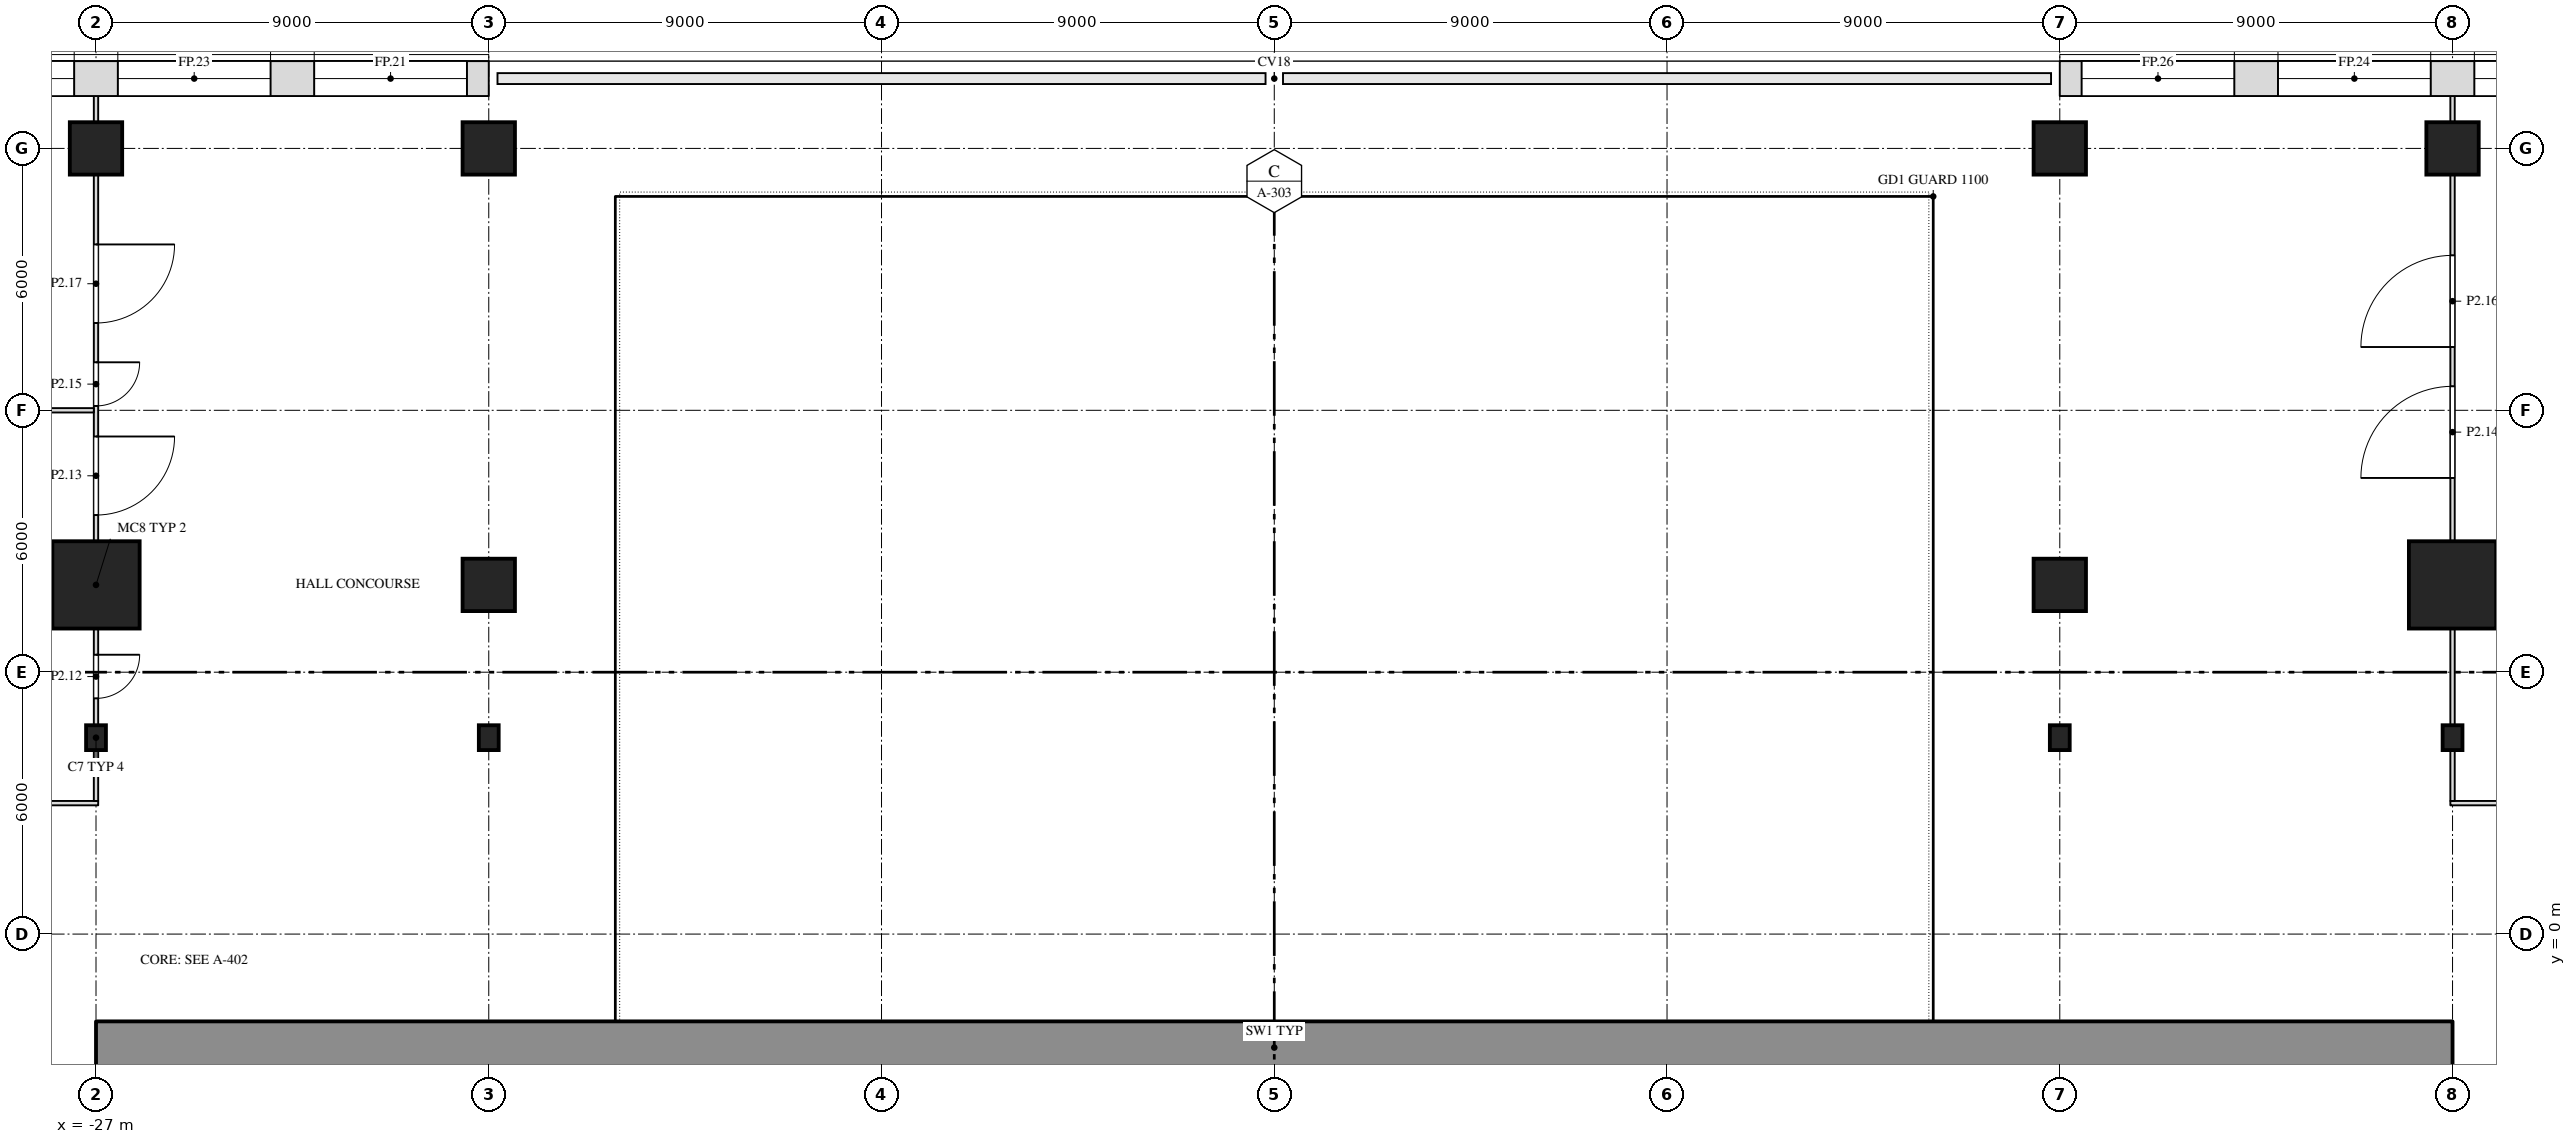
"""IFC4 building model, lengths in metres.
Left out: names, types, materials, properties, quantities, classifications, styles, units other than length and angle.
Written with IfcOpenShell. Run it as: python <this file> out.ifc"""

import sys

from ifc_helpers import new_model, si_unit, direction, frame, frame_2d, origin, origin_2d, place, context, subcontext, project, spatial, rectangle, i_section, extrude, element, fill, save


model = new_model("IFC4")
c1 = context("Model", 3, precision=1e-05, world=origin(), true_north=direction((0.0, 1.0)))
c2 = subcontext(c1, "Body", "Model", "MODEL_VIEW")
j1 = project(units=[si_unit("LENGTHUNIT", "METRE"), si_unit("PLANEANGLEUNIT", "RADIAN")], contexts=[c1])
p1 = place(None, origin())
s1 = spatial("IfcSite", under=j1, at=p1, CompositionType="ELEMENT")
p2 = place(p1, origin())
s2 = spatial("IfcBuilding", under=s1, at=p2, CompositionType="ELEMENT")
p3 = place(p2, frame((0.0, 0.0, 15.0)))
s3 = spatial("IfcBuildingStorey", under=s2, at=p3, CompositionType="ELEMENT", Elevation=15.0)
for number, where, z_axis, x_axis in (
    (1, (-27.0, 4.5, 0.0), (0.0, 0.0, 1.0), (1.0, 0.0, 0.0)),
    (2, (-18.0, 4.5, 0.0), (0.0, 0.0, 1.0), (1.0, 0.0, 0.0)),
    (3, (18.0, 4.5, 0.0), (0.0, 0.0, 1.0), (1.0, 0.0, 0.0)),
    (4, (27.0, 4.5, 0.0), (0.0, 0.0, 1.0), (1.0, 0.0, 0.0)),
):
    element("IfcColumn", number, at=place(p3, frame(where, z_axis=z_axis, x_axis=x_axis)), inside=s3, PredefinedType="COLUMN", context=c2, shape_type="SweptSolid", body=[
        extrude(i_section(OverallWidth=0.455, OverallDepth=0.569, WebThickness=0.078, FlangeThickness=0.125, at=origin_2d()), origin(), (0.0, 0.0, 1.0), 6.0),
    ])
p4 = place(p3, frame((-27.0, 8.0, 0.0), z_axis=(0.0, 0.0, 1.0), x_axis=(1.0, 0.0, 0.0)))
e5 = element("IfcColumn", 5, at=p4, inside=s3, PredefinedType="COLUMN", context=c2, shape_type="SweptSolid", body=[
    extrude(rectangle(XDim=2.0, YDim=2.0, at=origin_2d()), origin(), (0.0, 0.0, 1.0), 6.0),
])
for number, where, z_axis, x_axis in (
    (6, (-18.0, 8.0, 0.0), (0.0, 0.0, 1.0), (1.0, 0.0, 0.0)),
    (7, (18.0, 8.0, 0.0), (0.0, 0.0, 1.0), (1.0, 0.0, 0.0)),
):
    element("IfcColumn", number, at=place(p3, frame(where, z_axis=z_axis, x_axis=x_axis)), inside=s3, PredefinedType="COLUMN", context=c2, shape_type="SweptSolid", body=[
        extrude(rectangle(XDim=1.2, YDim=1.2, at=origin_2d()), origin(), (0.0, 0.0, 1.0), 6.0),
    ])
p5 = place(p3, frame((27.0, 8.0, 0.0), z_axis=(0.0, 0.0, 1.0), x_axis=(1.0, 0.0, 0.0)))
e8 = element("IfcColumn", 8, at=p5, inside=s3, PredefinedType="COLUMN", context=c2, shape_type="SweptSolid", body=[
    extrude(rectangle(XDim=2.0, YDim=2.0, at=origin_2d()), origin(), (0.0, 0.0, 1.0), 6.0),
])
for number, where, z_axis, x_axis in (
    (9, (-27.0, 18.0, 0.0), (0.0, 0.0, 1.0), (1.0, 0.0, 0.0)),
    (10, (-18.0, 18.0, 0.0), (0.0, 0.0, 1.0), (1.0, 0.0, 0.0)),
    (11, (18.0, 18.0, 0.0), (0.0, 0.0, 1.0), (1.0, 0.0, 0.0)),
    (12, (27.0, 18.0, 0.0), (0.0, 0.0, 1.0), (1.0, 0.0, 0.0)),
):
    element("IfcColumn", number, at=place(p3, frame(where, z_axis=z_axis, x_axis=x_axis)), inside=s3, PredefinedType="COLUMN", context=c2, shape_type="SweptSolid", body=[
        extrude(rectangle(XDim=1.2, YDim=1.2, at=origin_2d()), origin(), (0.0, 0.0, 1.0), 6.0),
    ])
p6 = place(p3, frame((-27.0, -2.6, 0.0), z_axis=(0.0, 0.0, 1.0), x_axis=(1.0, 0.0, 0.0)))
e13 = element("IfcWall", 13, at=p6, inside=s3, PredefinedType="SHEAR", context=c2, shape_type="SweptSolid", body=[
    extrude(rectangle(XDim=54.0, YDim=1.2, at=frame_2d((27.0, 0.0))), origin(), (0.0, 0.0, 1.0), 5.7),
])
p7 = place(p3, frame((-38.2, 3.0, 0.0), z_axis=(0.0, 0.0, 1.0), x_axis=(1.0, 0.0, 0.0)))
e14 = element("IfcWall", 14, at=p7, inside=s3, PredefinedType="PARTITIONING", context=c2, shape_type="SweptSolid", body=[
    extrude(rectangle(XDim=11.25, YDim=0.1, at=frame_2d((5.625, 0.0))), origin(), (0.0, 0.0, 1.0), 5.7),
])
p8 = place(p3, frame((-27.0, 3.05, 0.0), z_axis=(0.0, 0.0, 1.0), x_axis=(0.0, 1.0, 0.0)))
e15 = element("IfcWall", 15, at=p8, inside=s3, PredefinedType="PARTITIONING", context=c2, shape_type="SweptSolid", body=[
    extrude(rectangle(XDim=1.166, YDim=0.1, at=frame_2d((0.583, 0.0))), origin(), (0.0, 0.0, 1.0), 5.088),
])
p9 = place(p3, frame((-27.0, 4.784, 0.0), z_axis=(0.0, 0.0, 1.0), x_axis=(0.0, 1.0, 0.0)))
e16 = element("IfcWall", 16, at=p9, inside=s3, PredefinedType="PARTITIONING", context=c2, shape_type="SweptSolid", body=[
    extrude(rectangle(XDim=2.216, YDim=0.1, at=frame_2d((1.108, 0.0))), origin(), (0.0, 0.0, 1.0), 5.088),
])
p10 = place(p9, frame((0.615, 0.0, 0.0)))
e17 = element("IfcOpeningElement", 17, at=p10, cuts=e16, PredefinedType="OPENING", context=c2, shape_type="SweptSolid", body=[
    extrude(rectangle(XDim=1.0, YDim=2.1, at=frame_2d((0.5, 1.05))), frame((0.0, 0.062, 0.0), z_axis=(0.0, -1.0, 0.0), x_axis=(1.0, 0.0, 0.0)), (0.0, 0.0, 1.0), 0.124),
])
p11 = place(p3, frame((-27.0, 9.0, 0.0), z_axis=(0.0, 0.0, 1.0), x_axis=(0.0, 1.0, 0.0)))
e18 = element("IfcWall", 18, at=p11, inside=s3, PredefinedType="PARTITIONING", context=c2, shape_type="SweptSolid", body=[
    extrude(rectangle(XDim=8.4, YDim=0.1, at=frame_2d((4.2, 0.0))), origin(), (0.0, 0.0, 1.0), 5.088),
])
p12 = place(p11, frame((0.6, 0.0, 0.0)))
e19 = element("IfcOpeningElement", 19, at=p12, cuts=e18, PredefinedType="OPENING", context=c2, shape_type="SweptSolid", body=[
    extrude(rectangle(XDim=1.8, YDim=2.1, at=frame_2d((0.9, 1.05))), frame((0.0, 0.062, 0.0), z_axis=(0.0, -1.0, 0.0), x_axis=(1.0, 0.0, 0.0)), (0.0, 0.0, 1.0), 0.124),
])
p13 = place(p11, frame((3.1, 0.0, 0.0)))
e20 = element("IfcOpeningElement", 20, at=p13, cuts=e18, PredefinedType="OPENING", context=c2, shape_type="SweptSolid", body=[
    extrude(rectangle(XDim=1.0, YDim=2.1, at=frame_2d((0.5, 1.05))), frame((0.0, 0.062, 0.0), z_axis=(0.0, -1.0, 0.0), x_axis=(1.0, 0.0, 0.0)), (0.0, 0.0, 1.0), 0.124),
])
p14 = place(p11, frame((5.0, 0.0, 0.0)))
e21 = element("IfcOpeningElement", 21, at=p14, cuts=e18, PredefinedType="OPENING", context=c2, shape_type="SweptSolid", body=[
    extrude(rectangle(XDim=1.8, YDim=2.1, at=frame_2d((0.9, 1.05))), frame((0.0, 0.062, 0.0), z_axis=(0.0, -1.0, 0.0), x_axis=(1.0, 0.0, 0.0)), (0.0, 0.0, 1.0), 0.124),
])
p15 = place(p3, frame((-27.0, 18.6, 0.0), z_axis=(0.0, 0.0, 1.0), x_axis=(0.0, 1.0, 0.0)))
e22 = element("IfcWall", 22, at=p15, inside=s3, PredefinedType="PARTITIONING", context=c2, shape_type="SweptSolid", body=[
    extrude(rectangle(XDim=0.6, YDim=0.1, at=frame_2d((0.3, 0.0))), origin(), (0.0, 0.0, 1.0), 5.7),
])
p16 = place(p3, frame((26.95, 3.0, 0.0), z_axis=(0.0, 0.0, 1.0), x_axis=(1.0, 0.0, 0.0)))
e23 = element("IfcWall", 23, at=p16, inside=s3, PredefinedType="PARTITIONING", context=c2, shape_type="SweptSolid", body=[
    extrude(rectangle(XDim=11.25, YDim=0.1, at=frame_2d((5.625, 0.0))), origin(), (0.0, 0.0, 1.0), 5.7),
])
p17 = place(p3, frame((27.0, 3.05, 0.0), z_axis=(0.0, 0.0, 1.0), x_axis=(0.0, 1.0, 0.0)))
e24 = element("IfcWall", 24, at=p17, inside=s3, PredefinedType="PARTITIONING", context=c2, shape_type="SweptSolid", body=[
    extrude(rectangle(XDim=1.166, YDim=0.1, at=frame_2d((0.583, 0.0))), origin(), (0.0, 0.0, 1.0), 5.088),
])
p18 = place(p3, frame((27.0, 4.784, 0.0), z_axis=(0.0, 0.0, 1.0), x_axis=(0.0, 1.0, 0.0)))
e25 = element("IfcWall", 25, at=p18, inside=s3, PredefinedType="PARTITIONING", context=c2, shape_type="SweptSolid", body=[
    extrude(rectangle(XDim=2.216, YDim=0.1, at=frame_2d((1.108, 0.0))), origin(), (0.0, 0.0, 1.0), 5.088),
])
p19 = place(p3, frame((27.0, 9.0, 0.0), z_axis=(0.0, 0.0, 1.0), x_axis=(0.0, 1.0, 0.0)))
e26 = element("IfcWall", 26, at=p19, inside=s3, PredefinedType="PARTITIONING", context=c2, shape_type="SweptSolid", body=[
    extrude(rectangle(XDim=8.4, YDim=0.1, at=frame_2d((4.2, 0.0))), origin(), (0.0, 0.0, 1.0), 5.088),
])
p20 = place(p19, frame((1.45, 0.0, 0.0)))
e27 = element("IfcOpeningElement", 27, at=p20, cuts=e26, PredefinedType="OPENING", context=c2, shape_type="SweptSolid", body=[
    extrude(rectangle(XDim=2.1, YDim=2.4, at=frame_2d((1.05, 1.2))), frame((0.0, 0.062, 0.0), z_axis=(0.0, -1.0, 0.0), x_axis=(1.0, 0.0, 0.0)), (0.0, 0.0, 1.0), 0.124),
])
p21 = place(p19, frame((4.45, 0.0, 0.0)))
e28 = element("IfcOpeningElement", 28, at=p21, cuts=e26, PredefinedType="OPENING", context=c2, shape_type="SweptSolid", body=[
    extrude(rectangle(XDim=2.1, YDim=2.4, at=frame_2d((1.05, 1.2))), frame((0.0, 0.062, 0.0), z_axis=(0.0, -1.0, 0.0), x_axis=(1.0, 0.0, 0.0)), (0.0, 0.0, 1.0), 0.124),
])
p22 = place(p3, frame((27.0, 18.6, 0.0), z_axis=(0.0, 0.0, 1.0), x_axis=(0.0, 1.0, 0.0)))
e29 = element("IfcWall", 29, at=p22, inside=s3, PredefinedType="PARTITIONING", context=c2, shape_type="SweptSolid", body=[
    extrude(rectangle(XDim=0.6, YDim=0.1, at=frame_2d((0.3, 0.0))), origin(), (0.0, 0.0, 1.0), 5.7),
])
p23 = place(p3, frame((-38.2, 12.0, 0.0), z_axis=(0.0, 0.0, 1.0), x_axis=(1.0, 0.0, 0.0)))
e30 = element("IfcWall", 30, at=p23, inside=s3, PredefinedType="PARTITIONING", context=c2, shape_type="SweptSolid", body=[
    extrude(rectangle(XDim=11.15, YDim=0.1, at=frame_2d((5.575, 0.0))), origin(), (0.0, 0.0, 1.0), 5.7),
])
p24 = place(p3, frame((32.948, 19.6, 0.0), z_axis=(0.0, 0.0, 1.0), x_axis=(-1.0, 0.0, 0.0)))
e31 = element("IfcWall", 31, at=p24, inside=s3, PredefinedType="SOLIDWALL", context=c2, shape_type="SweptSolid", body=[
    extrude(rectangle(XDim=14.948, YDim=0.8, at=frame_2d((7.474, 0.0))), origin(), (0.0, 0.0, 1.0), 5.7),
])
p25 = place(p24, frame((1.948, 0.0, 1.0)))
e32 = element("IfcOpeningElement", 32, at=p25, cuts=e31, PredefinedType="OPENING", context=c2, shape_type="SweptSolid", body=[
    extrude(rectangle(XDim=3.5, YDim=4.0, at=frame_2d((1.75, 2.0))), frame((0.0, 0.412, 0.0), z_axis=(0.0, -1.0, 0.0), x_axis=(1.0, 0.0, 0.0)), (0.0, 0.0, 1.0), 0.824),
])
p26 = place(p24, frame((6.448, 0.0, 1.0)))
e33 = element("IfcOpeningElement", 33, at=p26, cuts=e31, PredefinedType="OPENING", context=c2, shape_type="SweptSolid", body=[
    extrude(rectangle(XDim=3.5, YDim=4.0, at=frame_2d((1.75, 2.0))), frame((0.0, 0.412, 0.0), z_axis=(0.0, -1.0, 0.0), x_axis=(1.0, 0.0, 0.0)), (0.0, 0.0, 1.0), 0.824),
])
p27 = place(p24, frame((10.948, 0.0, 1.0)))
e34 = element("IfcOpeningElement", 34, at=p27, cuts=e31, PredefinedType="OPENING", context=c2, shape_type="SweptSolid", body=[
    extrude(rectangle(XDim=3.5, YDim=4.0, at=frame_2d((1.75, 2.0))), frame((0.0, 0.412, 0.0), z_axis=(0.0, -1.0, 0.0), x_axis=(1.0, 0.0, 0.0)), (0.0, 0.0, 1.0), 0.824),
])
p28 = place(p3, frame((-18.0, 19.6, 0.0), z_axis=(0.0, 0.0, 1.0), x_axis=(-1.0, 0.0, 0.0)))
e35 = element("IfcWall", 35, at=p28, inside=s3, PredefinedType="SOLIDWALL", context=c2, shape_type="SweptSolid", body=[
    extrude(rectangle(XDim=14.948, YDim=0.8, at=frame_2d((7.474, 0.0))), origin(), (0.0, 0.0, 1.0), 5.7),
])
p29 = place(p28, frame((0.5, 0.0, 1.0)))
e36 = element("IfcOpeningElement", 36, at=p29, cuts=e35, PredefinedType="OPENING", context=c2, shape_type="SweptSolid", body=[
    extrude(rectangle(XDim=3.5, YDim=4.0, at=frame_2d((1.75, 2.0))), frame((0.0, 0.412, 0.0), z_axis=(0.0, -1.0, 0.0), x_axis=(1.0, 0.0, 0.0)), (0.0, 0.0, 1.0), 0.824),
])
p30 = place(p28, frame((5.0, 0.0, 1.0)))
e37 = element("IfcOpeningElement", 37, at=p30, cuts=e35, PredefinedType="OPENING", context=c2, shape_type="SweptSolid", body=[
    extrude(rectangle(XDim=3.5, YDim=4.0, at=frame_2d((1.75, 2.0))), frame((0.0, 0.412, 0.0), z_axis=(0.0, -1.0, 0.0), x_axis=(1.0, 0.0, 0.0)), (0.0, 0.0, 1.0), 0.824),
])
p31 = place(p28, frame((9.5, 0.0, 1.0)))
e38 = element("IfcOpeningElement", 38, at=p31, cuts=e35, PredefinedType="OPENING", context=c2, shape_type="SweptSolid", body=[
    extrude(rectangle(XDim=3.5, YDim=4.0, at=frame_2d((1.75, 2.0))), frame((0.0, 0.412, 0.0), z_axis=(0.0, -1.0, 0.0), x_axis=(1.0, 0.0, 0.0)), (0.0, 0.0, 1.0), 0.824),
])
p32 = place(p10, origin())
e39 = element("IfcDoor", 39, at=p32, inside=s3, OperationType="SINGLE_SWING_LEFT", PredefinedType="DOOR", context=c2, shape_type="SweptSolid", body=[
    extrude(rectangle(XDim=1.0, YDim=2.1, at=frame_2d((0.5, 1.05))), frame((0.0, 0.025, 0.0), z_axis=(0.0, -1.0, 0.0), x_axis=(1.0, 0.0, 0.0)), (0.0, 0.0, 1.0), 0.05),
])
fill(e17, e39)
p33 = place(p12, origin())
e40 = element("IfcDoor", 40, at=p33, inside=s3, OperationType="DOUBLE_DOOR_SINGLE_SWING", PredefinedType="DOOR", context=c2, shape_type="SweptSolid", body=[
    extrude(rectangle(XDim=1.8, YDim=2.1, at=frame_2d((0.9, 1.05))), frame((0.0, 0.025, 0.0), z_axis=(0.0, -1.0, 0.0), x_axis=(1.0, 0.0, 0.0)), (0.0, 0.0, 1.0), 0.05),
])
fill(e19, e40)
p34 = place(p20, origin())
e41 = element("IfcDoor", 41, at=p34, inside=s3, OperationType="DOUBLE_DOOR_SINGLE_SWING", PredefinedType="DOOR", context=c2, shape_type="SweptSolid", body=[
    extrude(rectangle(XDim=2.1, YDim=2.4, at=frame_2d((1.05, 1.2))), frame((0.0, 0.025, 0.0), z_axis=(0.0, -1.0, 0.0), x_axis=(1.0, 0.0, 0.0)), (0.0, 0.0, 1.0), 0.05),
])
fill(e27, e41)
p35 = place(p13, origin())
e42 = element("IfcDoor", 42, at=p35, inside=s3, OperationType="SINGLE_SWING_LEFT", PredefinedType="DOOR", context=c2, shape_type="SweptSolid", body=[
    extrude(rectangle(XDim=1.0, YDim=2.1, at=frame_2d((0.5, 1.05))), frame((0.0, 0.025, 0.0), z_axis=(0.0, -1.0, 0.0), x_axis=(1.0, 0.0, 0.0)), (0.0, 0.0, 1.0), 0.05),
])
fill(e20, e42)
p36 = place(p21, origin())
e43 = element("IfcDoor", 43, at=p36, inside=s3, OperationType="DOUBLE_DOOR_SINGLE_SWING", PredefinedType="DOOR", context=c2, shape_type="SweptSolid", body=[
    extrude(rectangle(XDim=2.1, YDim=2.4, at=frame_2d((1.05, 1.2))), frame((0.0, 0.025, 0.0), z_axis=(0.0, -1.0, 0.0), x_axis=(1.0, 0.0, 0.0)), (0.0, 0.0, 1.0), 0.05),
])
fill(e28, e43)
p37 = place(p14, origin())
e44 = element("IfcDoor", 44, at=p37, inside=s3, OperationType="DOUBLE_DOOR_SINGLE_SWING", PredefinedType="DOOR", context=c2, shape_type="SweptSolid", body=[
    extrude(rectangle(XDim=1.8, YDim=2.1, at=frame_2d((0.9, 1.05))), frame((0.0, 0.025, 0.0), z_axis=(0.0, -1.0, 0.0), x_axis=(1.0, 0.0, 0.0)), (0.0, 0.0, 1.0), 0.05),
])
fill(e21, e44)
p38 = place(p29, origin())
e45 = element("IfcWindow", 45, at=p38, inside=s3, PartitioningType="SINGLE_PANEL", PredefinedType="WINDOW", context=c2, shape_type="SweptSolid", body=[
    extrude(rectangle(XDim=3.5, YDim=4.0, at=frame_2d((1.75, 2.0))), frame((0.0, 0.03, 0.0), z_axis=(0.0, -1.0, 0.0), x_axis=(1.0, 0.0, 0.0)), (0.0, 0.0, 1.0), 0.06),
])
fill(e36, e45)
p39 = place(p25, origin())
e46 = element("IfcWindow", 46, at=p39, inside=s3, PartitioningType="SINGLE_PANEL", PredefinedType="WINDOW", context=c2, shape_type="SweptSolid", body=[
    extrude(rectangle(XDim=3.5, YDim=4.0, at=frame_2d((1.75, 2.0))), frame((0.0, 0.03, 0.0), z_axis=(0.0, -1.0, 0.0), x_axis=(1.0, 0.0, 0.0)), (0.0, 0.0, 1.0), 0.06),
])
fill(e32, e46)
p40 = place(p30, origin())
e47 = element("IfcWindow", 47, at=p40, inside=s3, PartitioningType="SINGLE_PANEL", PredefinedType="WINDOW", context=c2, shape_type="SweptSolid", body=[
    extrude(rectangle(XDim=3.5, YDim=4.0, at=frame_2d((1.75, 2.0))), frame((0.0, 0.03, 0.0), z_axis=(0.0, -1.0, 0.0), x_axis=(1.0, 0.0, 0.0)), (0.0, 0.0, 1.0), 0.06),
])
fill(e37, e47)
p41 = place(p26, origin())
e48 = element("IfcWindow", 48, at=p41, inside=s3, PartitioningType="SINGLE_PANEL", PredefinedType="WINDOW", context=c2, shape_type="SweptSolid", body=[
    extrude(rectangle(XDim=3.5, YDim=4.0, at=frame_2d((1.75, 2.0))), frame((0.0, 0.03, 0.0), z_axis=(0.0, -1.0, 0.0), x_axis=(1.0, 0.0, 0.0)), (0.0, 0.0, 1.0), 0.06),
])
fill(e33, e48)
p42 = place(p31, origin())
e49 = element("IfcWindow", 49, at=p42, inside=s3, PartitioningType="SINGLE_PANEL", PredefinedType="WINDOW", context=c2, shape_type="SweptSolid", body=[
    extrude(rectangle(XDim=3.5, YDim=4.0, at=frame_2d((1.75, 2.0))), frame((0.0, 0.03, 0.0), z_axis=(0.0, -1.0, 0.0), x_axis=(1.0, 0.0, 0.0)), (0.0, 0.0, 1.0), 0.06),
])
fill(e38, e49)
p43 = place(p27, origin())
e50 = element("IfcWindow", 50, at=p43, inside=s3, PartitioningType="SINGLE_PANEL", PredefinedType="WINDOW", context=c2, shape_type="SweptSolid", body=[
    extrude(rectangle(XDim=3.5, YDim=4.0, at=frame_2d((1.75, 2.0))), frame((0.0, 0.03, 0.0), z_axis=(0.0, -1.0, 0.0), x_axis=(1.0, 0.0, 0.0)), (0.0, 0.0, 1.0), 0.06),
])
fill(e34, e50)
save(model, sys.argv[1])
